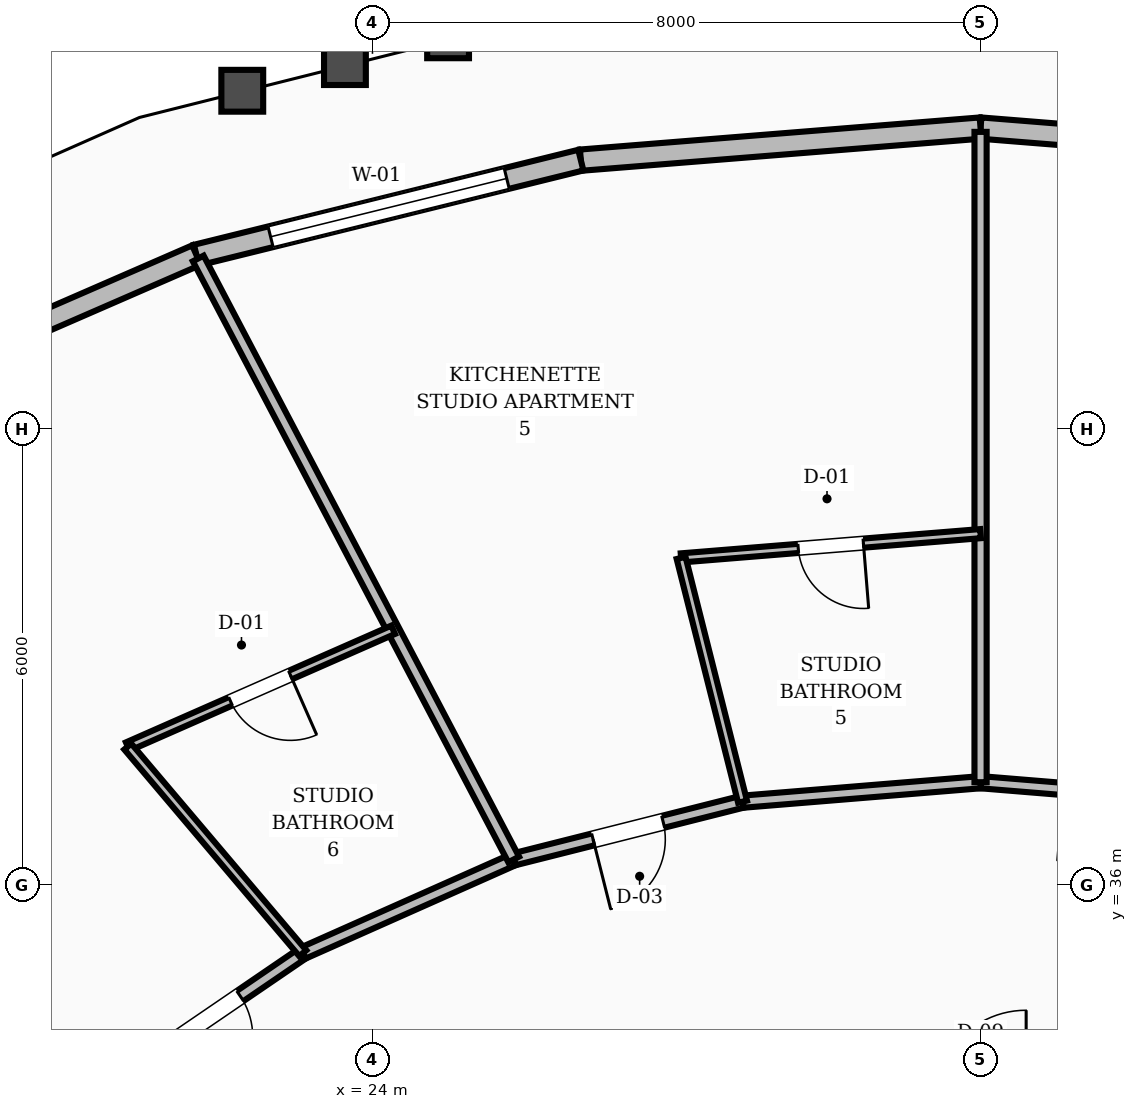
"""IFC4 building model, lengths in metres.
Left out: names, types, materials, properties, quantities, classifications, styles, units other than length and angle.
Written with IfcOpenShell. Run it as: python <this file> out.ifc"""

import sys

from ifc_helpers import new_model, si_unit, direction, frame, frame_2d, origin, place, context, subcontext, project, spatial, rectangle, extrude, element, fill, save


model = new_model("IFC4")
c1 = context("Model", 3, precision=1e-05, world=origin(), true_north=direction((0.0, 1.0)))
c2 = subcontext(c1, "Body", "Model", "MODEL_VIEW")
j1 = project(units=[si_unit("LENGTHUNIT", "METRE"), si_unit("PLANEANGLEUNIT", "RADIAN")], contexts=[c1])
p1 = place(None, origin())
s1 = spatial("IfcSite", under=j1, at=p1, CompositionType="ELEMENT")
p2 = place(p1, origin())
s2 = spatial("IfcBuilding", under=s1, at=p2, CompositionType="ELEMENT")
p3 = place(p2, frame((0.0, 0.0, 70.0)))
s3 = spatial("IfcBuildingStorey", under=s2, at=p3, CompositionType="ELEMENT", Elevation=70.0)
p4 = place(p3, frame((37.259, 45.534, 0.0), z_axis=(0.0, 0.0, 1.0), x_axis=(-0.996797596899, 0.07996593535, 0.0)))
e1 = element("IfcWall", 1, at=p4, inside=s3, PredefinedType="STANDARD", context=c2, shape_type="SweptSolid", body=[
    extrude(rectangle(XDim=5.276, YDim=0.28, at=frame_2d((2.638, 0.0))), origin(), (0.0, 0.0, 1.0), 2.71),
])
p5 = place(p4, frame((1.038, 0.0, 0.8)))
e2 = element("IfcOpeningElement", 2, at=p5, cuts=e1, PredefinedType="OPENING", context=c2, shape_type="SweptSolid", body=[
    extrude(rectangle(XDim=3.2, YDim=1.65, at=frame_2d((1.6, 0.825))), frame((0.0, 0.15, 0.0), z_axis=(0.0, -1.0, 0.0), x_axis=(1.0, 0.0, 0.0)), (0.0, 0.0, 1.0), 0.3),
])
p6 = place(p3, frame((32.0, 45.956, 0.0), z_axis=(0.0, 0.0, 1.0), x_axis=(-0.996797596899, -0.07996593535, 0.0)))
e3 = element("IfcWall", 3, at=p6, inside=s3, PredefinedType="STANDARD", context=c2, shape_type="SweptSolid", body=[
    extrude(rectangle(XDim=5.276, YDim=0.28, at=frame_2d((2.638, 0.0))), origin(), (0.0, 0.0, 1.0), 2.71),
])
p7 = place(p3, frame((26.741, 45.534, 0.0), z_axis=(0.0, 0.0, 1.0), x_axis=(-0.970800603404, -0.239887866368, 0.0)))
e4 = element("IfcWall", 4, at=p7, inside=s3, PredefinedType="STANDARD", context=c2, shape_type="SweptSolid", body=[
    extrude(rectangle(XDim=5.209, YDim=0.28, at=frame_2d((2.604, 0.0))), origin(), (0.0, 0.0, 1.0), 2.71),
])
p8 = place(p7, frame((1.004, 0.0, 0.8)))
e5 = element("IfcOpeningElement", 5, at=p8, cuts=e4, PredefinedType="OPENING", context=c2, shape_type="SweptSolid", body=[
    extrude(rectangle(XDim=3.2, YDim=1.65, at=frame_2d((1.6, 0.825))), frame((0.0, 0.15, 0.0), z_axis=(0.0, -1.0, 0.0), x_axis=(1.0, 0.0, 0.0)), (0.0, 0.0, 1.0), 0.3),
])
p9 = place(p3, frame((21.685, 44.284, 0.0), z_axis=(0.0, 0.0, 1.0), x_axis=(-0.916886688659, -0.399147591951, 0.0)))
e6 = element("IfcWall", 6, at=p9, inside=s3, PredefinedType="STANDARD", context=c2, shape_type="SweptSolid", body=[
    extrude(rectangle(XDim=5.083, YDim=0.28, at=frame_2d((2.542, 0.0))), origin(), (0.0, 0.0, 1.0), 2.71),
])
p10 = place(p3, frame((35.131, 37.094, 0.0), z_axis=(0.0, 0.0, 1.0), x_axis=(-0.996658973252, 0.081675522876, 0.0)))
e7 = element("IfcWall", 7, at=p10, inside=s3, PredefinedType="SOLIDWALL", context=c2, shape_type="SweptSolid", body=[
    extrude(rectangle(XDim=3.142, YDim=0.16, at=frame_2d((1.571, 0.0))), origin(), (0.0, 0.0, 1.0), 2.71),
])
p11 = place(p10, frame((1.096, 0.0, 0.0)))
e8 = element("IfcOpeningElement", 8, at=p11, cuts=e7, PredefinedType="OPENING", context=c2, shape_type="SweptSolid", body=[
    extrude(rectangle(XDim=0.95, YDim=2.1, at=frame_2d((0.475, 1.05))), frame((0.0, 0.09, 0.0), z_axis=(0.0, -1.0, 0.0), x_axis=(1.0, 0.0, 0.0)), (0.0, 0.0, 1.0), 0.18),
])
p12 = place(p3, frame((32.0, 37.35, 0.0), z_axis=(0.0, 0.0, 1.0), x_axis=(-0.996658973252, -0.081675522876, 0.0)))
e9 = element("IfcWall", 9, at=p12, inside=s3, PredefinedType="SOLIDWALL", context=c2, shape_type="SweptSolid", body=[
    extrude(rectangle(XDim=3.142, YDim=0.16, at=frame_2d((1.571, 0.0))), origin(), (0.0, 0.0, 1.0), 2.71),
])
p13 = place(p3, frame((28.869, 37.094, 0.0), z_axis=(0.0, 0.0, 1.0), x_axis=(-0.969608333194, -0.244662380029, 0.0)))
e10 = element("IfcWall", 10, at=p13, inside=s3, PredefinedType="SOLIDWALL", context=c2, shape_type="SweptSolid", body=[
    extrude(rectangle(XDim=3.105, YDim=0.16, at=frame_2d((1.553, 0.0))), origin(), (0.0, 0.0, 1.0), 2.71),
])
p14 = place(p13, frame((1.078, 0.0, 0.0)))
e11 = element("IfcOpeningElement", 11, at=p14, cuts=e10, PredefinedType="OPENING", context=c2, shape_type="SweptSolid", body=[
    extrude(rectangle(XDim=0.95, YDim=2.1, at=frame_2d((0.475, 1.05))), frame((0.0, 0.09, 0.0), z_axis=(0.0, -1.0, 0.0), x_axis=(1.0, 0.0, 0.0)), (0.0, 0.0, 1.0), 0.18),
])
p15 = place(p3, frame((25.858, 36.334, 0.0), z_axis=(0.0, 0.0, 1.0), x_axis=(-0.913768445178, -0.406235434936, 0.0)))
e12 = element("IfcWall", 12, at=p15, inside=s3, PredefinedType="SOLIDWALL", context=c2, shape_type="SweptSolid", body=[
    extrude(rectangle(XDim=3.037, YDim=0.16, at=frame_2d((1.519, 0.0))), origin(), (0.0, 0.0, 1.0), 2.71),
])
p16 = place(p3, frame((23.083, 35.1, 0.0), z_axis=(0.0, 0.0, 1.0), x_axis=(-0.825929039072, -0.563774088104, 0.0)))
e13 = element("IfcWall", 13, at=p16, inside=s3, PredefinedType="SOLIDWALL", context=c2, shape_type="SweptSolid", body=[
    extrude(rectangle(XDim=2.945, YDim=0.16, at=frame_2d((1.472, 0.0))), origin(), (0.0, 0.0, 1.0), 2.71),
])
p17 = place(p16, frame((0.997, 0.0, 0.0)))
e14 = element("IfcOpeningElement", 14, at=p17, cuts=e13, PredefinedType="OPENING", context=c2, shape_type="SweptSolid", body=[
    extrude(rectangle(XDim=0.95, YDim=2.1, at=frame_2d((0.475, 1.05))), frame((0.0, 0.09, 0.0), z_axis=(0.0, -1.0, 0.0), x_axis=(1.0, 0.0, 0.0)), (0.0, 0.0, 1.0), 0.18),
])
p18 = place(p3, frame((32.0, 37.35, 0.0), z_axis=(0.0, 0.0, 1.0), x_axis=(0.0, 1.0, 0.0)))
e15 = element("IfcWall", 15, at=p18, inside=s3, PredefinedType="SOLIDWALL", context=c2, shape_type="SweptSolid", body=[
    extrude(rectangle(XDim=8.556, YDim=0.16, at=frame_2d((4.278, 0.0))), origin(), (0.0, 0.0, 1.0), 2.71),
])
p19 = place(p3, frame((32.0, 40.62, 0.0), z_axis=(0.0, 0.0, 1.0), x_axis=(-0.996731064863, -0.080790991686, 0.0)))
e16 = element("IfcWall", 16, at=p19, inside=s3, PredefinedType="PARTITIONING", context=c2, shape_type="SweptSolid", body=[
    extrude(rectangle(XDim=3.953, YDim=0.12, at=frame_2d((1.976, 0.0))), origin(), (0.0, 0.0, 1.0), 2.71),
])
p20 = place(p19, frame((1.546, 0.0, 0.0)))
e17 = element("IfcOpeningElement", 17, at=p20, cuts=e16, PredefinedType="OPENING", context=c2, shape_type="SweptSolid", body=[
    extrude(rectangle(XDim=0.86, YDim=2.1, at=frame_2d((0.43, 1.05))), frame((0.0, 0.07, 0.0), z_axis=(0.0, -1.0, 0.0), x_axis=(1.0, 0.0, 0.0)), (0.0, 0.0, 1.0), 0.14),
])
p21 = place(p3, frame((28.869, 37.094, 0.0), z_axis=(0.0, 0.0, 1.0), x_axis=(-0.244462922871, 0.969658640626, 0.0)))
e18 = element("IfcWall", 18, at=p21, inside=s3, PredefinedType="PARTITIONING", context=c2, shape_type="SweptSolid", body=[
    extrude(rectangle(XDim=3.308, YDim=0.12, at=frame_2d((1.654, 0.0))), origin(), (0.0, 0.0, 1.0), 2.71),
])
p22 = place(p3, frame((25.858, 36.334, 0.0), z_axis=(0.0, 0.0, 1.0), x_axis=(-0.464766918633, 0.885433064294, 0.0)))
e19 = element("IfcWall", 19, at=p22, inside=s3, PredefinedType="SOLIDWALL", context=c2, shape_type="SweptSolid", body=[
    extrude(rectangle(XDim=8.929, YDim=0.16, at=frame_2d((4.465, 0.0))), origin(), (0.0, 0.0, 1.0), 2.71),
])
p23 = place(p3, frame((24.272, 39.355, 0.0), z_axis=(0.0, 0.0, 1.0), x_axis=(-0.915338626919, -0.40268498615, 0.0)))
e20 = element("IfcWall", 20, at=p23, inside=s3, PredefinedType="PARTITIONING", context=c2, shape_type="SweptSolid", body=[
    extrude(rectangle(XDim=3.814, YDim=0.12, at=frame_2d((1.907, 0.0))), origin(), (0.0, 0.0, 1.0), 2.71),
])
p24 = place(p23, frame((1.477, 0.0, 0.0)))
e21 = element("IfcOpeningElement", 21, at=p24, cuts=e20, PredefinedType="OPENING", context=c2, shape_type="SweptSolid", body=[
    extrude(rectangle(XDim=0.86, YDim=2.1, at=frame_2d((0.43, 1.05))), frame((0.0, 0.07, 0.0), z_axis=(0.0, -1.0, 0.0), x_axis=(1.0, 0.0, 0.0)), (0.0, 0.0, 1.0), 0.14),
])
p25 = place(p3, frame((23.083, 35.1, 0.0), z_axis=(0.0, 0.0, 1.0), x_axis=(-0.64619716823, 0.763170505045, 0.0)))
e22 = element("IfcWall", 22, at=p25, inside=s3, PredefinedType="PARTITIONING", context=c2, shape_type="SweptSolid", body=[
    extrude(rectangle(XDim=3.563, YDim=0.12, at=frame_2d((1.781, 0.0))), origin(), (0.0, 0.0, 1.0), 2.71),
])
p26 = place(p8, origin())
e23 = element("IfcWindow", 23, at=p26, inside=s3, PartitioningType="SINGLE_PANEL", PredefinedType="WINDOW", context=c2, shape_type="SweptSolid", body=[
    extrude(rectangle(XDim=3.2, YDim=1.65, at=frame_2d((1.6, 0.825))), frame((0.0, 0.03, 0.0), z_axis=(0.0, -1.0, 0.0), x_axis=(1.0, 0.0, 0.0)), (0.0, 0.0, 1.0), 0.06),
])
fill(e5, e23)
p27 = place(p20, origin())
e24 = element("IfcDoor", 24, at=p27, inside=s3, OperationType="SINGLE_SWING_LEFT", PredefinedType="DOOR", context=c2, shape_type="SweptSolid", body=[
    extrude(rectangle(XDim=0.86, YDim=2.1, at=frame_2d((0.43, 1.05))), frame((0.0, 0.025, 0.0), z_axis=(0.0, -1.0, 0.0), x_axis=(1.0, 0.0, 0.0)), (0.0, 0.0, 1.0), 0.05),
])
fill(e17, e24)
p28 = place(p14, origin())
e25 = element("IfcDoor", 25, at=p28, inside=s3, OperationType="SINGLE_SWING_RIGHT", PredefinedType="DOOR", context=c2, shape_type="SweptSolid", body=[
    extrude(rectangle(XDim=0.95, YDim=2.1, at=frame_2d((0.475, 1.05))), frame((0.0, 0.025, 0.0), z_axis=(0.0, -1.0, 0.0), x_axis=(1.0, 0.0, 0.0)), (0.0, 0.0, 1.0), 0.05),
])
fill(e11, e25)
p29 = place(p24, origin())
e26 = element("IfcDoor", 26, at=p29, inside=s3, OperationType="SINGLE_SWING_LEFT", PredefinedType="DOOR", context=c2, shape_type="SweptSolid", body=[
    extrude(rectangle(XDim=0.86, YDim=2.1, at=frame_2d((0.43, 1.05))), frame((0.0, 0.025, 0.0), z_axis=(0.0, -1.0, 0.0), x_axis=(1.0, 0.0, 0.0)), (0.0, 0.0, 1.0), 0.05),
])
fill(e21, e26)
p30 = place(p17, origin())
e27 = element("IfcDoor", 27, at=p30, inside=s3, OperationType="SINGLE_SWING_RIGHT", PredefinedType="DOOR", context=c2, shape_type="SweptSolid", body=[
    extrude(rectangle(XDim=0.95, YDim=2.1, at=frame_2d((0.475, 1.05))), frame((0.0, 0.025, 0.0), z_axis=(0.0, -1.0, 0.0), x_axis=(1.0, 0.0, 0.0)), (0.0, 0.0, 1.0), 0.05),
])
fill(e14, e27)
save(model, sys.argv[1])
